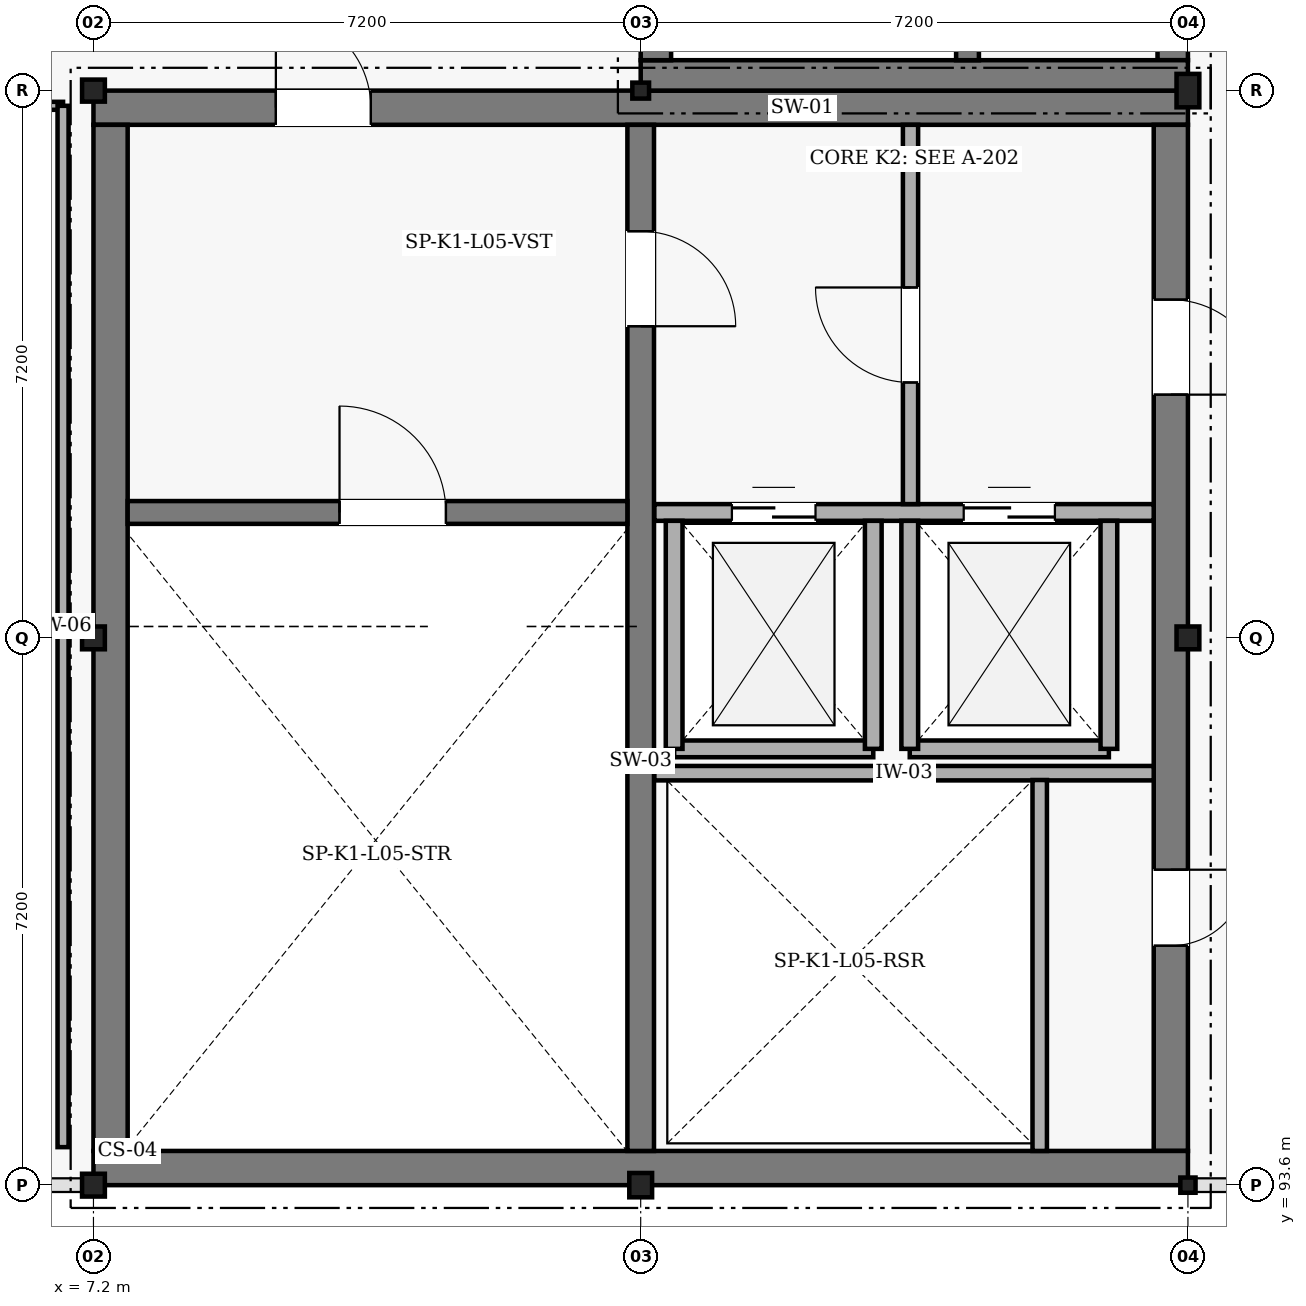
"""IFC4 building model, lengths in metres.
Left out: names, types, materials, properties, quantities, classifications, styles, units other than length and angle.
Written with IfcOpenShell. Run it as: python <this file> out.ifc"""

import sys

from ifc_helpers import new_model, si_unit, direction, frame, frame_2d, origin, origin_2d, place, context, subcontext, project, spatial, rectangle, i_section, extrude, element, fill, save


model = new_model("IFC4")
c1 = context("Model", 3, precision=1e-05, world=origin(), true_north=direction((0.0, 1.0)))
c2 = subcontext(c1, "Body", "Model", "MODEL_VIEW")
j1 = project(units=[si_unit("LENGTHUNIT", "METRE"), si_unit("PLANEANGLEUNIT", "RADIAN")], contexts=[c1])
p1 = place(None, origin())
s1 = spatial("IfcSite", under=j1, at=p1, CompositionType="ELEMENT")
p2 = place(p1, origin())
s2 = spatial("IfcBuilding", under=s1, at=p2, CompositionType="ELEMENT")
p3 = place(p2, frame((0.0, 0.0, 21.6)))
s3 = spatial("IfcBuildingStorey", under=s2, at=p3, CompositionType="ELEMENT", Elevation=21.6)
p4 = place(p3, frame((7.2, 107.775, 0.0), z_axis=(0.0, 0.0, 1.0), x_axis=(1.0, 0.0, 0.0)))
e1 = element("IfcWall", 1, at=p4, inside=s3, PredefinedType="SHEAR", context=c2, shape_type="SweptSolid", body=[
    extrude(rectangle(XDim=14.4, YDim=0.45, at=frame_2d((7.2, 0.0))), origin(), (0.0, 0.0, 1.0), 3.62),
])
p5 = place(p4, frame((2.4, 0.0, 0.0)))
e2 = element("IfcOpeningElement", 2, at=p5, cuts=e1, PredefinedType="OPENING", context=c2, shape_type="SweptSolid", body=[
    extrude(rectangle(XDim=1.25, YDim=2.2, at=frame_2d((0.625, 1.1))), frame((0.0, 0.235, 0.0), z_axis=(0.0, -1.0, 0.0), x_axis=(1.0, 0.0, 0.0)), (0.0, 0.0, 1.0), 0.47),
])
p6 = place(p3, frame((21.375, 107.55, 0.0), z_axis=(0.0, 0.0, 1.0), x_axis=(0.0, -1.0, 0.0)))
e3 = element("IfcWall", 3, at=p6, inside=s3, PredefinedType="SHEAR", context=c2, shape_type="SweptSolid", body=[
    extrude(rectangle(XDim=13.5, YDim=0.45, at=frame_2d((6.75, 0.0))), origin(), (0.0, 0.0, 1.0), 3.62),
])
p7 = place(p6, frame((9.8, 0.0, 0.0)))
e4 = element("IfcOpeningElement", 4, at=p7, cuts=e3, PredefinedType="OPENING", context=c2, shape_type="SweptSolid", body=[
    extrude(rectangle(XDim=1.0, YDim=2.15, at=frame_2d((0.5, 1.075))), frame((0.0, 0.235, 0.0), z_axis=(0.0, -1.0, 0.0), x_axis=(1.0, 0.0, 0.0)), (0.0, 0.0, 1.0), 0.47),
])
p8 = place(p6, frame((2.3, 0.0, 0.0)))
e5 = element("IfcOpeningElement", 5, at=p8, cuts=e3, PredefinedType="OPENING", context=c2, shape_type="SweptSolid", body=[
    extrude(rectangle(XDim=1.25, YDim=2.2, at=frame_2d((0.625, 1.1))), frame((0.0, 0.235, 0.0), z_axis=(0.0, -1.0, 0.0), x_axis=(1.0, 0.0, 0.0)), (0.0, 0.0, 1.0), 0.47),
])
p9 = place(p3, frame((21.6, 93.825, 0.0), z_axis=(0.0, 0.0, 1.0), x_axis=(-1.0, 0.0, 0.0)))
e6 = element("IfcWall", 6, at=p9, inside=s3, PredefinedType="SHEAR", context=c2, shape_type="SweptSolid", body=[
    extrude(rectangle(XDim=14.4, YDim=0.45, at=frame_2d((7.2, 0.0))), origin(), (0.0, 0.0, 1.0), 3.62),
])
p10 = place(p3, frame((7.425, 94.05, 0.0), z_axis=(0.0, 0.0, 1.0), x_axis=(0.0, 1.0, 0.0)))
e7 = element("IfcWall", 7, at=p10, inside=s3, PredefinedType="SHEAR", context=c2, shape_type="SweptSolid", body=[
    extrude(rectangle(XDim=13.5, YDim=0.45, at=frame_2d((6.75, 0.0))), origin(), (0.0, 0.0, 1.0), 3.62),
])
p11 = place(p3, frame((14.4, 107.55, 0.0), z_axis=(0.0, 0.0, 1.0), x_axis=(0.0, -1.0, 0.0)))
e8 = element("IfcWall", 8, at=p11, inside=s3, PredefinedType="SHEAR", context=c2, shape_type="SweptSolid", body=[
    extrude(rectangle(XDim=13.5, YDim=0.35, at=frame_2d((6.75, 0.0))), origin(), (0.0, 0.0, 1.0), 3.62),
])
p12 = place(p11, frame((1.4, 0.0, 0.0)))
e9 = element("IfcOpeningElement", 9, at=p12, cuts=e8, PredefinedType="OPENING", context=c2, shape_type="SweptSolid", body=[
    extrude(rectangle(XDim=1.25, YDim=2.2, at=frame_2d((0.625, 1.1))), frame((0.0, 0.185, 0.0), z_axis=(0.0, -1.0, 0.0), x_axis=(1.0, 0.0, 0.0)), (0.0, 0.0, 1.0), 0.37),
])
p13 = place(p3, frame((7.65, 102.45, 0.0), z_axis=(0.0, 0.0, 1.0), x_axis=(1.0, 0.0, 0.0)))
e10 = element("IfcWall", 10, at=p13, inside=s3, PredefinedType="SHEAR", context=c2, shape_type="SweptSolid", body=[
    extrude(rectangle(XDim=6.575, YDim=0.3, at=frame_2d((3.288, 0.0))), origin(), (0.0, 0.0, 1.0), 3.62),
])
p14 = place(p13, frame((2.788, 0.0, 0.0)))
e11 = element("IfcOpeningElement", 11, at=p14, cuts=e10, PredefinedType="OPENING", context=c2, shape_type="SweptSolid", body=[
    extrude(rectangle(XDim=1.4, YDim=2.2, at=frame_2d((0.7, 1.1))), frame((0.0, 0.16, 0.0), z_axis=(0.0, -1.0, 0.0), x_axis=(1.0, 0.0, 0.0)), (0.0, 0.0, 1.0), 0.32),
])
p15 = place(p3, frame((21.4, 122.0, 0.0), z_axis=(0.0, 0.0, 1.0), x_axis=(0.0, -1.0, 0.0)))
e12 = element("IfcWall", 12, at=p15, inside=s3, PredefinedType="SHEAR", context=c2, shape_type="SweptSolid", body=[
    extrude(rectangle(XDim=13.6, YDim=0.4, at=frame_2d((6.8, 0.0))), origin(), (0.0, 0.0, 1.0), 3.62),
])
p16 = place(p15, frame((2.3, 0.0, 0.0)))
e13 = element("IfcOpeningElement", 13, at=p16, cuts=e12, PredefinedType="OPENING", context=c2, shape_type="SweptSolid", body=[
    extrude(rectangle(XDim=1.25, YDim=2.2, at=frame_2d((0.625, 1.1))), frame((0.0, 0.21, 0.0), z_axis=(0.0, -1.0, 0.0), x_axis=(1.0, 0.0, 0.0)), (0.0, 0.0, 1.0), 0.42),
])
p17 = place(p3, frame((21.6, 108.2, 0.0), z_axis=(0.0, 0.0, 1.0), x_axis=(-1.0, 0.0, 0.0)))
e14 = element("IfcWall", 14, at=p17, inside=s3, PredefinedType="SHEAR", context=c2, shape_type="SweptSolid", body=[
    extrude(rectangle(XDim=7.2, YDim=0.4, at=frame_2d((3.6, 0.0))), origin(), (0.0, 0.0, 1.0), 3.62),
])
p18 = place(p3, frame((14.6, 108.4, 0.0), z_axis=(0.0, 0.0, 1.0), x_axis=(0.0, 1.0, 0.0)))
e15 = element("IfcWall", 15, at=p18, inside=s3, PredefinedType="SHEAR", context=c2, shape_type="SweptSolid", body=[
    extrude(rectangle(XDim=13.6, YDim=0.4, at=frame_2d((6.8, 0.0))), origin(), (0.0, 0.0, 1.0), 3.62),
])
p19 = place(p18, frame((9.8, 0.0, 0.0)))
e16 = element("IfcOpeningElement", 16, at=p19, cuts=e15, PredefinedType="OPENING", context=c2, shape_type="SweptSolid", body=[
    extrude(rectangle(XDim=1.25, YDim=2.2, at=frame_2d((0.625, 1.1))), frame((0.0, 0.21, 0.0), z_axis=(0.0, -1.0, 0.0), x_axis=(1.0, 0.0, 0.0)), (0.0, 0.0, 1.0), 0.42),
])
p20 = place(p3, frame((18.7, 116.7, 0.0), z_axis=(0.0, 0.0, 1.0), x_axis=(0.0, -1.0, 0.0)))
e17 = element("IfcWall", 17, at=p20, inside=s3, PredefinedType="SHEAR", context=c2, shape_type="SweptSolid", body=[
    extrude(rectangle(XDim=8.3, YDim=0.3, at=frame_2d((4.15, 0.0))), origin(), (0.0, 0.0, 1.0), 3.62),
])
for number, where, z_axis, x_axis in (
    (18, (7.2, 93.6, 0.0), (0.0, 0.0, 1.0), (1.0, 0.0, 0.0)),
    (19, (7.2, 100.8, 0.0), (0.0, 0.0, 1.0), (1.0, 0.0, 0.0)),
):
    element("IfcColumn", number, at=place(p3, frame(where, z_axis=z_axis, x_axis=x_axis)), inside=s3, PredefinedType="COLUMN", context=c2, shape_type="SweptSolid", body=[
        extrude(i_section(OverallWidth=0.3, OverallDepth=0.3, WebThickness=0.011, FlangeThickness=0.019, FilletRadius=0.027, at=origin_2d()), origin(), (0.0, 0.0, 1.0), 3.62),
    ])
p21 = place(p3, frame((7.2, 108.0, 0.0), z_axis=(0.0, 0.0, 1.0), x_axis=(1.0, 0.0, 0.0)))
e20 = element("IfcColumn", 20, at=p21, inside=s3, PredefinedType="COLUMN", context=c2, shape_type="SweptSolid", body=[
    extrude(i_section(OverallWidth=0.3, OverallDepth=0.29, WebThickness=0.009, FlangeThickness=0.014, FilletRadius=0.027, at=origin_2d()), origin(), (0.0, 0.0, 1.0), 3.62),
])
p22 = place(p3, frame((14.4, 93.6, 0.0), z_axis=(0.0, 0.0, 1.0), x_axis=(1.0, 0.0, 0.0)))
e21 = element("IfcColumn", 21, at=p22, inside=s3, PredefinedType="COLUMN", context=c2, shape_type="SweptSolid", body=[
    extrude(i_section(OverallWidth=0.3, OverallDepth=0.32, WebThickness=0.011, FlangeThickness=0.021, FilletRadius=0.027, at=origin_2d()), origin(), (0.0, 0.0, 1.0), 3.62),
])
p23 = place(p3, frame((14.4, 108.0, 0.0), z_axis=(0.0, 0.0, 1.0), x_axis=(1.0, 0.0, 0.0)))
e22 = element("IfcColumn", 22, at=p23, inside=s3, PredefinedType="COLUMN", context=c2, shape_type="SweptSolid", body=[
    extrude(i_section(OverallWidth=0.22, OverallDepth=0.21, WebThickness=0.007, FlangeThickness=0.011, FilletRadius=0.018, at=origin_2d()), origin(), (0.0, 0.0, 1.0), 3.62),
])
p24 = place(p3, frame((21.6, 93.6, 0.0), z_axis=(0.0, 0.0, 1.0), x_axis=(1.0, 0.0, 0.0)))
e23 = element("IfcColumn", 23, at=p24, inside=s3, PredefinedType="COLUMN", context=c2, shape_type="SweptSolid", body=[
    extrude(i_section(OverallWidth=0.2, OverallDepth=0.2, WebThickness=0.009, FlangeThickness=0.015, FilletRadius=0.018, at=origin_2d()), origin(), (0.0, 0.0, 1.0), 3.62),
])
p25 = place(p3, frame((21.6, 100.8, 0.0), z_axis=(0.0, 0.0, 1.0), x_axis=(1.0, 0.0, 0.0)))
e24 = element("IfcColumn", 24, at=p25, inside=s3, PredefinedType="COLUMN", context=c2, shape_type="SweptSolid", body=[
    extrude(i_section(OverallWidth=0.3, OverallDepth=0.3, WebThickness=0.011, FlangeThickness=0.019, FilletRadius=0.027, at=origin_2d()), origin(), (0.0, 0.0, 1.0), 3.62),
])
p26 = place(p3, frame((21.6, 108.0, 0.0), z_axis=(0.0, 0.0, 1.0), x_axis=(1.0, 0.0, 0.0)))
e25 = element("IfcColumn", 25, at=p26, inside=s3, PredefinedType="COLUMN", context=c2, shape_type="SweptSolid", body=[
    extrude(i_section(OverallWidth=0.3, OverallDepth=0.44, WebThickness=0.011, FlangeThickness=0.021, FilletRadius=0.027, at=origin_2d()), origin(), (0.0, 0.0, 1.0), 3.62),
])
p27 = place(p3, frame((14.58, 99.02, 0.0), z_axis=(0.0, 0.0, 1.0), x_axis=(1.0, 0.0, 0.0)))
e26 = element("IfcWall", 26, at=p27, inside=s3, PredefinedType="PARTITIONING", context=c2, shape_type="SweptSolid", body=[
    extrude(rectangle(XDim=6.57, YDim=0.19, at=frame_2d((3.285, 0.0))), origin(), (0.0, 0.0, 1.0), 3.55),
])
p28 = place(p3, frame((19.65, 94.05, 0.0), z_axis=(0.0, 0.0, 1.0), x_axis=(0.0, 1.0, 0.0)))
e27 = element("IfcWall", 27, at=p28, inside=s3, PredefinedType="PARTITIONING", context=c2, shape_type="SweptSolid", body=[
    extrude(rectangle(XDim=4.88, YDim=0.19, at=frame_2d((2.44, 0.0))), origin(), (0.0, 0.0, 1.0), 3.55),
])
p29 = place(p3, frame((14.58, 102.45, 0.0), z_axis=(0.0, 0.0, 1.0), x_axis=(1.0, 0.0, 0.0)))
e28 = element("IfcWall", 28, at=p29, inside=s3, PredefinedType="PARTITIONING", context=c2, shape_type="SweptSolid", body=[
    extrude(rectangle(XDim=6.57, YDim=0.22, at=frame_2d((3.285, 0.0))), origin(), (0.0, 0.0, 1.0), 3.55),
])
p30 = place(p29, frame((1.02, 0.0, 0.0)))
e29 = element("IfcOpeningElement", 29, at=p30, cuts=e28, PredefinedType="OPENING", context=c2, shape_type="SweptSolid", body=[
    extrude(rectangle(XDim=1.1, YDim=2.15, at=frame_2d((0.55, 1.075))), frame((0.0, 0.12, 0.0), z_axis=(0.0, -1.0, 0.0), x_axis=(1.0, 0.0, 0.0)), (0.0, 0.0, 1.0), 0.24),
])
p31 = place(p29, frame((4.07, 0.0, 0.0)))
e30 = element("IfcOpeningElement", 30, at=p31, cuts=e28, PredefinedType="OPENING", context=c2, shape_type="SweptSolid", body=[
    extrude(rectangle(XDim=1.2, YDim=2.15, at=frame_2d((0.6, 1.075))), frame((0.0, 0.12, 0.0), z_axis=(0.0, -1.0, 0.0), x_axis=(1.0, 0.0, 0.0)), (0.0, 0.0, 1.0), 0.24),
])
p32 = place(p3, frame((14.84, 99.34, 0.0), z_axis=(0.0, 0.0, 1.0), x_axis=(1.0, 0.0, 0.0)))
e31 = element("IfcWall", 31, at=p32, inside=s3, PredefinedType="PARTITIONING", context=c2, shape_type="SweptSolid", body=[
    extrude(rectangle(XDim=2.62, YDim=0.22, at=frame_2d((1.31, 0.0))), origin(), (0.0, 0.0, 1.0), 3.55),
])
for number, where, z_axis, x_axis in (
    (32, (14.84, 99.34, 0.0), (0.0, 0.0, 1.0), (0.0, 1.0, 0.0)),
    (33, (17.46, 99.34, 0.0), (0.0, 0.0, 1.0), (0.0, 1.0, 0.0)),
):
    element("IfcWall", number, at=place(p3, frame(where, z_axis=z_axis, x_axis=x_axis)), inside=s3, PredefinedType="PARTITIONING", context=c2, shape_type="SweptSolid", body=[
        extrude(rectangle(XDim=3.0, YDim=0.22, at=frame_2d((1.5, 0.0))), origin(), (0.0, 0.0, 1.0), 3.55),
    ])
p33 = place(p3, frame((17.94, 99.34, 0.0), z_axis=(0.0, 0.0, 1.0), x_axis=(1.0, 0.0, 0.0)))
e34 = element("IfcWall", 34, at=p33, inside=s3, PredefinedType="PARTITIONING", context=c2, shape_type="SweptSolid", body=[
    extrude(rectangle(XDim=2.62, YDim=0.22, at=frame_2d((1.31, 0.0))), origin(), (0.0, 0.0, 1.0), 3.55),
])
for number, where, z_axis, x_axis in (
    (35, (17.94, 99.34, 0.0), (0.0, 0.0, 1.0), (0.0, 1.0, 0.0)),
    (36, (20.56, 99.34, 0.0), (0.0, 0.0, 1.0), (0.0, 1.0, 0.0)),
):
    element("IfcWall", number, at=place(p3, frame(where, z_axis=z_axis, x_axis=x_axis)), inside=s3, PredefinedType="PARTITIONING", context=c2, shape_type="SweptSolid", body=[
        extrude(rectangle(XDim=3.0, YDim=0.22, at=frame_2d((1.5, 0.0))), origin(), (0.0, 0.0, 1.0), 3.55),
    ])
p34 = place(p3, frame((17.95, 102.56, 0.0), z_axis=(0.0, 0.0, 1.0), x_axis=(0.0, 1.0, 0.0)))
e37 = element("IfcWall", 37, at=p34, inside=s3, PredefinedType="PARTITIONING", context=c2, shape_type="SweptSolid", body=[
    extrude(rectangle(XDim=4.99, YDim=0.2, at=frame_2d((2.495, 0.0))), origin(), (0.0, 0.0, 1.0), 3.55),
])
p35 = place(p34, frame((1.6, 0.0, 0.0)))
e38 = element("IfcOpeningElement", 38, at=p35, cuts=e37, PredefinedType="OPENING", context=c2, shape_type="SweptSolid", body=[
    extrude(rectangle(XDim=1.25, YDim=2.2, at=frame_2d((0.625, 1.1))), frame((0.0, 0.11, 0.0), z_axis=(0.0, -1.0, 0.0), x_axis=(1.0, 0.0, 0.0)), (0.0, 0.0, 1.0), 0.22),
])
p36 = place(p3, frame((0.5, 107.8, 0.0), z_axis=(0.0, 0.0, 1.0), x_axis=(1.0, 0.0, 0.0)))
e39 = element("IfcWall", 39, at=p36, inside=s3, PredefinedType="PARTITIONING", context=c2, shape_type="SweptSolid", body=[
    extrude(rectangle(XDim=6.3, YDim=0.105, at=frame_2d((3.15, 0.0))), origin(), (0.0, 0.0, 1.0), 3.17),
])
p37 = place(p36, frame((2.325, 0.0, 0.0)))
e40 = element("IfcOpeningElement", 40, at=p37, cuts=e39, PredefinedType="OPENING", context=c2, shape_type="SweptSolid", body=[
    extrude(rectangle(XDim=1.65, YDim=2.25, at=frame_2d((0.825, 1.125))), frame((0.0, 0.062, 0.0), z_axis=(0.0, -1.0, 0.0), x_axis=(1.0, 0.0, 0.0)), (0.0, 0.0, 1.0), 0.125),
])
p38 = place(p3, frame((6.8, 107.8, 0.0), z_axis=(0.0, 0.0, 1.0), x_axis=(0.0, -1.0, 0.0)))
e41 = element("IfcWall", 41, at=p38, inside=s3, PredefinedType="PARTITIONING", context=c2, shape_type="SweptSolid", body=[
    extrude(rectangle(XDim=13.7, YDim=0.145, at=frame_2d((6.85, 0.0))), origin(), (0.0, 0.0, 1.0), 3.17),
])
p39 = place(p14, origin())
e42 = element("IfcDoor", 42, at=p39, inside=s3, OperationType="SINGLE_SWING_LEFT", PredefinedType="DOOR", context=c2, shape_type="SweptSolid", body=[
    extrude(rectangle(XDim=1.4, YDim=2.2, at=frame_2d((0.7, 1.1))), frame((0.0, 0.025, 0.0), z_axis=(0.0, -1.0, 0.0), x_axis=(1.0, 0.0, 0.0)), (0.0, 0.0, 1.0), 0.05),
])
fill(e11, e42)
p40 = place(p12, origin())
e43 = element("IfcDoor", 43, at=p40, inside=s3, OperationType="SINGLE_SWING_RIGHT", PredefinedType="DOOR", context=c2, shape_type="SweptSolid", body=[
    extrude(rectangle(XDim=1.25, YDim=2.2, at=frame_2d((0.625, 1.1))), frame((0.0, 0.025, 0.0), z_axis=(0.0, -1.0, 0.0), x_axis=(1.0, 0.0, 0.0)), (0.0, 0.0, 1.0), 0.05),
])
fill(e9, e43)
p41 = place(p7, origin())
e44 = element("IfcDoor", 44, at=p41, inside=s3, OperationType="SINGLE_SWING_LEFT", PredefinedType="DOOR", context=c2, shape_type="SweptSolid", body=[
    extrude(rectangle(XDim=1.0, YDim=2.15, at=frame_2d((0.5, 1.075))), frame((0.0, 0.025, 0.0), z_axis=(0.0, -1.0, 0.0), x_axis=(1.0, 0.0, 0.0)), (0.0, 0.0, 1.0), 0.05),
])
fill(e4, e44)
p42 = place(p30, origin())
e45 = element("IfcDoor", 45, at=p42, inside=s3, OperationType="DOUBLE_DOOR_SLIDING", PredefinedType="DOOR", context=c2, shape_type="SweptSolid", body=[
    extrude(rectangle(XDim=1.1, YDim=2.15, at=frame_2d((0.55, 1.075))), frame((0.0, 0.025, 0.0), z_axis=(0.0, -1.0, 0.0), x_axis=(1.0, 0.0, 0.0)), (0.0, 0.0, 1.0), 0.05),
])
fill(e29, e45)
p43 = place(p31, origin())
e46 = element("IfcDoor", 46, at=p43, inside=s3, OperationType="DOUBLE_DOOR_SLIDING", PredefinedType="DOOR", context=c2, shape_type="SweptSolid", body=[
    extrude(rectangle(XDim=1.2, YDim=2.15, at=frame_2d((0.6, 1.075))), frame((0.0, 0.025, 0.0), z_axis=(0.0, -1.0, 0.0), x_axis=(1.0, 0.0, 0.0)), (0.0, 0.0, 1.0), 0.05),
])
fill(e30, e46)
p44 = place(p35, origin())
e47 = element("IfcDoor", 47, at=p44, inside=s3, OperationType="SINGLE_SWING_RIGHT", PredefinedType="DOOR", context=c2, shape_type="SweptSolid", body=[
    extrude(rectangle(XDim=1.25, YDim=2.2, at=frame_2d((0.625, 1.1))), frame((0.0, 0.025, 0.0), z_axis=(0.0, -1.0, 0.0), x_axis=(1.0, 0.0, 0.0)), (0.0, 0.0, 1.0), 0.05),
])
fill(e38, e47)
p45 = place(p5, origin())
e48 = element("IfcDoor", 48, at=p45, inside=s3, OperationType="SINGLE_SWING_LEFT", PredefinedType="DOOR", context=c2, shape_type="SweptSolid", body=[
    extrude(rectangle(XDim=1.25, YDim=2.2, at=frame_2d((0.625, 1.1))), frame((0.0, 0.025, 0.0), z_axis=(0.0, -1.0, 0.0), x_axis=(1.0, 0.0, 0.0)), (0.0, 0.0, 1.0), 0.05),
])
fill(e2, e48)
p46 = place(p8, origin())
e49 = element("IfcDoor", 49, at=p46, inside=s3, OperationType="SINGLE_SWING_RIGHT", PredefinedType="DOOR", context=c2, shape_type="SweptSolid", body=[
    extrude(rectangle(XDim=1.25, YDim=2.2, at=frame_2d((0.625, 1.1))), frame((0.0, 0.025, 0.0), z_axis=(0.0, -1.0, 0.0), x_axis=(1.0, 0.0, 0.0)), (0.0, 0.0, 1.0), 0.05),
])
fill(e5, e49)
save(model, sys.argv[1])
